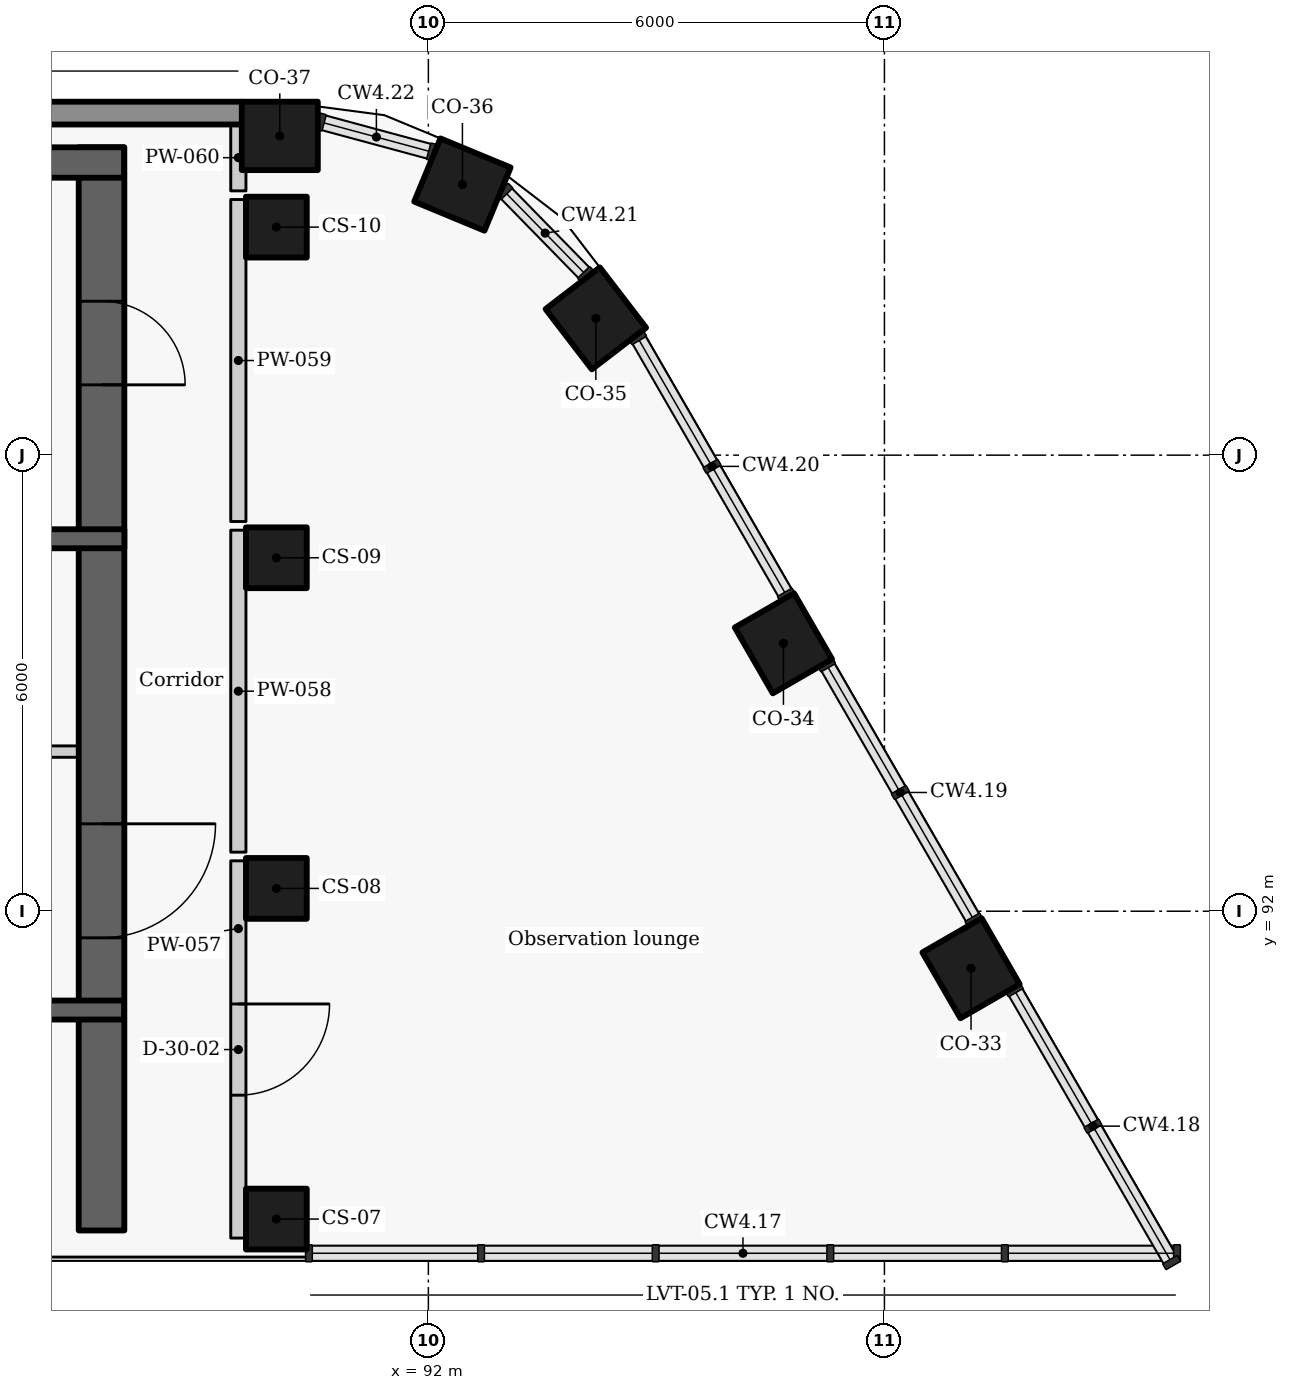
"""IFC4 building model, lengths in metres.
Left out: names, types, materials, properties, quantities, classifications, styles, units other than length and angle.
Written with IfcOpenShell. Run it as: python <this file> out.ifc"""

import sys

from ifc_helpers import new_model, si_unit, direction, frame, frame_2d, origin, origin_2d, place, context, subcontext, project, spatial, rectangle, extrude, element, fill, save


model = new_model("IFC4")
c1 = context("Model", 3, precision=1e-05, world=origin(), true_north=direction((0.0, 1.0)))
c2 = subcontext(c1, "Body", "Model", "MODEL_VIEW")
j1 = project(units=[si_unit("LENGTHUNIT", "METRE"), si_unit("PLANEANGLEUNIT", "RADIAN")], contexts=[c1])
p1 = place(None, origin())
s1 = spatial("IfcSite", under=j1, at=p1, CompositionType="ELEMENT")
p2 = place(p1, origin())
s2 = spatial("IfcBuilding", under=s1, at=p2, CompositionType="ELEMENT")
p3 = place(p2, frame((0.0, 0.0, 283.2)))
s3 = spatial("IfcBuildingStorey", under=s2, at=p3, CompositionType="ELEMENT", Elevation=283.2)
for number, where, z_axis, x_axis in (
    (1, (99.139, 91.25, 0.0), (0.0, 0.0, 1.0), (-0.5, 0.866, 0.0)),
    (2, (96.671, 95.525, 0.0), (0.0, 0.0, 1.0), (-0.5, 0.866, 0.0)),
    (3, (94.203, 99.8, 0.0), (0.0, 0.0, 1.0), (-0.609, 0.793, 0.0)),
    (4, (92.448, 101.56, 0.0), (0.0, 0.0, 1.0), (-0.924, 0.383, 0.0)),
    (5, (90.045, 102.2, 0.0), (0.0, 0.0, 1.0), (-1.0, 0.0, 0.0)),
):
    element("IfcColumn", number, at=place(p3, frame(where, z_axis=z_axis, x_axis=x_axis)), inside=s3, PredefinedType="COLUMN", context=c2, shape_type="SweptSolid", body=[
        extrude(rectangle(XDim=1.0, YDim=0.9, at=origin_2d()), origin(), (0.0, 0.0, 1.0), 3.6),
    ])
for number, where, z_axis, x_axis in (
    (6, (90.0, 87.95, 0.0), (0.0, 0.0, 1.0), (0.0, 1.0, 0.0)),
    (7, (90.0, 92.3, 0.0), (0.0, 0.0, 1.0), (0.0, 1.0, 0.0)),
    (8, (90.0, 96.65, 0.0), (0.0, 0.0, 1.0), (0.0, 1.0, 0.0)),
    (9, (90.0, 101.0, 0.0), (0.0, 0.0, 1.0), (0.0, 1.0, 0.0)),
):
    element("IfcColumn", number, at=place(p3, frame(where, z_axis=z_axis, x_axis=x_axis)), inside=s3, PredefinedType="COLUMN", context=c2, shape_type="SweptSolid", body=[
        extrude(rectangle(XDim=0.8, YDim=0.8, at=origin_2d()), origin(), (0.0, 0.0, 1.0), 3.6),
    ])
p4 = place(p3, frame((89.549, 102.5, 0.0), z_axis=(0.0, 0.0, 1.0), x_axis=(-1.0, 0.0, 0.0)))
e10 = element("IfcWall", 10, at=p4, inside=s3, PredefinedType="SOLIDWALL", context=c2, shape_type="SweptSolid", body=[
    extrude(rectangle(XDim=19.134, YDim=0.3, at=frame_2d((9.567, 0.0))), origin(), (0.0, 0.0, 1.0), 2.725),
])
p5 = place(p3, frame((85.397, 94.1, 0.0), z_axis=(0.0, 0.0, 1.0), x_axis=(1.0, 0.0, 0.0)))
e11 = element("IfcWall", 11, at=p5, inside=s3, PredefinedType="PARTITIONING", context=c2, shape_type="SweptSolid", body=[
    extrude(rectangle(XDim=2.603, YDim=0.15, at=frame_2d((1.302, 0.0))), origin(), (0.0, 0.0, 1.0), 3.325),
])
p6 = place(p5, frame((0.528, 0.0, 0.0)))
e12 = element("IfcOpeningElement", 12, at=p6, cuts=e11, PredefinedType="OPENING", context=c2, shape_type="SweptSolid", body=[
    extrude(rectangle(XDim=0.9, YDim=2.1, at=frame_2d((0.45, 1.05))), frame((0.0, 0.085, 0.0), z_axis=(0.0, -1.0, 0.0), x_axis=(1.0, 0.0, 0.0)), (0.0, 0.0, 1.0), 0.17),
])
p7 = place(p3, frame((87.7, 102.05, -0.275), z_axis=(0.0, 0.0, 1.0), x_axis=(0.0, -1.0, 0.0)))
e13 = element("IfcWall", 13, at=p7, inside=s3, PredefinedType="SHEAR", context=c2, shape_type="SweptSolid", body=[
    extrude(rectangle(XDim=11.35, YDim=0.6, at=frame_2d((5.675, 0.0))), origin(), (0.0, 0.0, 1.0), 3.6),
])
p8 = place(p7, frame((8.9, 0.0, 0.275)))
e14 = element("IfcOpeningElement", 14, at=p8, cuts=e13, PredefinedType="OPENING", context=c2, shape_type="SweptSolid", body=[
    extrude(rectangle(XDim=1.5, YDim=2.1, at=frame_2d((0.75, 1.05))), frame((0.0, 0.31, 0.0), z_axis=(0.0, -1.0, 0.0), x_axis=(1.0, 0.0, 0.0)), (0.0, 0.0, 1.0), 0.62),
])
p9 = place(p7, frame((2.025, 0.0, 0.275)))
e15 = element("IfcOpeningElement", 15, at=p9, cuts=e13, PredefinedType="OPENING", context=c2, shape_type="SweptSolid", body=[
    extrude(rectangle(XDim=1.1, YDim=2.1, at=frame_2d((0.55, 1.05))), frame((0.0, 0.31, 0.0), z_axis=(0.0, -1.0, 0.0), x_axis=(1.0, 0.0, 0.0)), (0.0, 0.0, 1.0), 0.62),
])
p10 = place(p3, frame((80.547, 96.9, -0.275), z_axis=(0.0, 0.0, 1.0), x_axis=(1.0, 0.0, 0.0)))
e16 = element("IfcWall", 16, at=p10, inside=s3, PredefinedType="SHEAR", context=c2, shape_type="SweptSolid", body=[
    extrude(rectangle(XDim=7.453, YDim=0.25, at=frame_2d((3.727, 0.0))), origin(), (0.0, 0.0, 1.0), 3.6),
])
p11 = place(p10, frame((3.302, 0.0, 0.275)))
e17 = element("IfcOpeningElement", 17, at=p11, cuts=e16, PredefinedType="OPENING", context=c2, shape_type="SweptSolid", body=[
    extrude(rectangle(XDim=1.1, YDim=2.1, at=frame_2d((0.55, 1.05))), frame((0.0, 0.135, 0.0), z_axis=(0.0, -1.0, 0.0), x_axis=(1.0, 0.0, 0.0)), (0.0, 0.0, 1.0), 0.27),
])
p12 = place(p3, frame((89.5, 92.663, 0.0), z_axis=(0.0, 0.0, 1.0), x_axis=(0.0, -1.0, 0.0)))
e18 = element("IfcWall", 18, at=p12, inside=s3, PredefinedType="PARTITIONING", context=c2, shape_type="SweptSolid", body=[
    extrude(rectangle(XDim=4.963, YDim=0.2, at=frame_2d((2.481, 0.0))), origin(), (0.0, 0.0, 1.0), 3.325),
])
p13 = place(p12, frame((1.883, 0.0, 0.0)))
e19 = element("IfcOpeningElement", 19, at=p13, cuts=e18, PredefinedType="OPENING", context=c2, shape_type="SweptSolid", body=[
    extrude(rectangle(XDim=1.2, YDim=2.1, at=frame_2d((0.6, 1.05))), frame((0.0, 0.11, 0.0), z_axis=(0.0, -1.0, 0.0), x_axis=(1.0, 0.0, 0.0)), (0.0, 0.0, 1.0), 0.22),
])
p14 = place(p3, frame((89.5, 92.777, 0.0), z_axis=(0.0, 0.0, 1.0), x_axis=(0.0, 1.0, 0.0)))
e20 = element("IfcWall", 20, at=p14, inside=s3, PredefinedType="PARTITIONING", context=c2, shape_type="SweptSolid", body=[
    extrude(rectangle(XDim=4.236, YDim=0.2, at=frame_2d((2.118, 0.0))), origin(), (0.0, 0.0, 1.0), 3.325),
])
p15 = place(p3, frame((89.5, 97.127, 0.0), z_axis=(0.0, 0.0, 1.0), x_axis=(0.0, 1.0, 0.0)))
e21 = element("IfcWall", 21, at=p15, inside=s3, PredefinedType="PARTITIONING", context=c2, shape_type="SweptSolid", body=[
    extrude(rectangle(XDim=4.236, YDim=0.2, at=frame_2d((2.118, 0.0))), origin(), (0.0, 0.0, 1.0), 3.325),
])
p16 = place(p3, frame((89.5, 101.477, 0.0), z_axis=(0.0, 0.0, 1.0), x_axis=(0.0, 1.0, 0.0)))
e22 = element("IfcWall", 22, at=p16, inside=s3, PredefinedType="PARTITIONING", context=c2, shape_type="SweptSolid", body=[
    extrude(rectangle(XDim=0.873, YDim=0.2, at=frame_2d((0.437, 0.0))), origin(), (0.0, 0.0, 1.0), 3.325),
])
p17 = place(p3, frame((87.7, 87.8, -0.275), z_axis=(0.0, 0.0, 1.0), x_axis=(0.0, 1.0, 0.0)))
e23 = element("IfcWall", 23, at=p17, inside=s3, PredefinedType="SHEAR", context=c2, shape_type="SweptSolid", body=[
    extrude(rectangle(XDim=2.896, YDim=0.6, at=frame_2d((1.448, 0.0))), origin(), (0.0, 0.0, 1.0), 3.6),
])
p18 = place(p3, frame((85.404, 90.7, -0.275), z_axis=(0.0, 0.0, 1.0), x_axis=(1.0, 0.0, 0.0)))
e24 = element("IfcWall", 24, at=p18, inside=s3, PredefinedType="SHEAR", context=c2, shape_type="SweptSolid", body=[
    extrude(rectangle(XDim=2.592, YDim=0.25, at=frame_2d((1.296, 0.0))), origin(), (0.0, 0.0, 1.0), 3.6),
])
p19 = place(p3, frame((72.004, 101.85, -0.275), z_axis=(0.0, 0.0, 1.0), x_axis=(1.0, 0.0, 0.0)))
e25 = element("IfcWall", 25, at=p19, inside=s3, PredefinedType="SHEAR", context=c2, shape_type="SweptSolid", body=[
    extrude(rectangle(XDim=15.992, YDim=0.4, at=frame_2d((7.996, 0.0))), origin(), (0.0, 0.0, 1.0), 3.6),
])
p20 = place(p13, origin())
e26 = element("IfcDoor", 26, at=p20, inside=s3, OperationType="SINGLE_SWING_LEFT", PredefinedType="DOOR", context=c2, shape_type="SweptSolid", body=[
    extrude(rectangle(XDim=1.2, YDim=2.1, at=frame_2d((0.6, 1.05))), frame((0.0, 0.025, 0.0), z_axis=(0.0, -1.0, 0.0), x_axis=(1.0, 0.0, 0.0)), (0.0, 0.0, 1.0), 0.05),
])
fill(e19, e26)
p21 = place(p8, origin())
e27 = element("IfcDoor", 27, at=p21, inside=s3, OperationType="DOUBLE_DOOR_SINGLE_SWING", PredefinedType="DOOR", context=c2, shape_type="SweptSolid", body=[
    extrude(rectangle(XDim=1.5, YDim=2.1, at=frame_2d((0.75, 1.05))), frame((0.0, 0.025, 0.0), z_axis=(0.0, -1.0, 0.0), x_axis=(1.0, 0.0, 0.0)), (0.0, 0.0, 1.0), 0.05),
])
fill(e14, e27)
p22 = place(p9, origin())
e28 = element("IfcDoor", 28, at=p22, inside=s3, OperationType="SINGLE_SWING_RIGHT", PredefinedType="DOOR", context=c2, shape_type="SweptSolid", body=[
    extrude(rectangle(XDim=1.1, YDim=2.1, at=frame_2d((0.55, 1.05))), frame((0.0, 0.025, 0.0), z_axis=(0.0, -1.0, 0.0), x_axis=(1.0, 0.0, 0.0)), (0.0, 0.0, 1.0), 0.05),
])
fill(e15, e28)
save(model, sys.argv[1])
